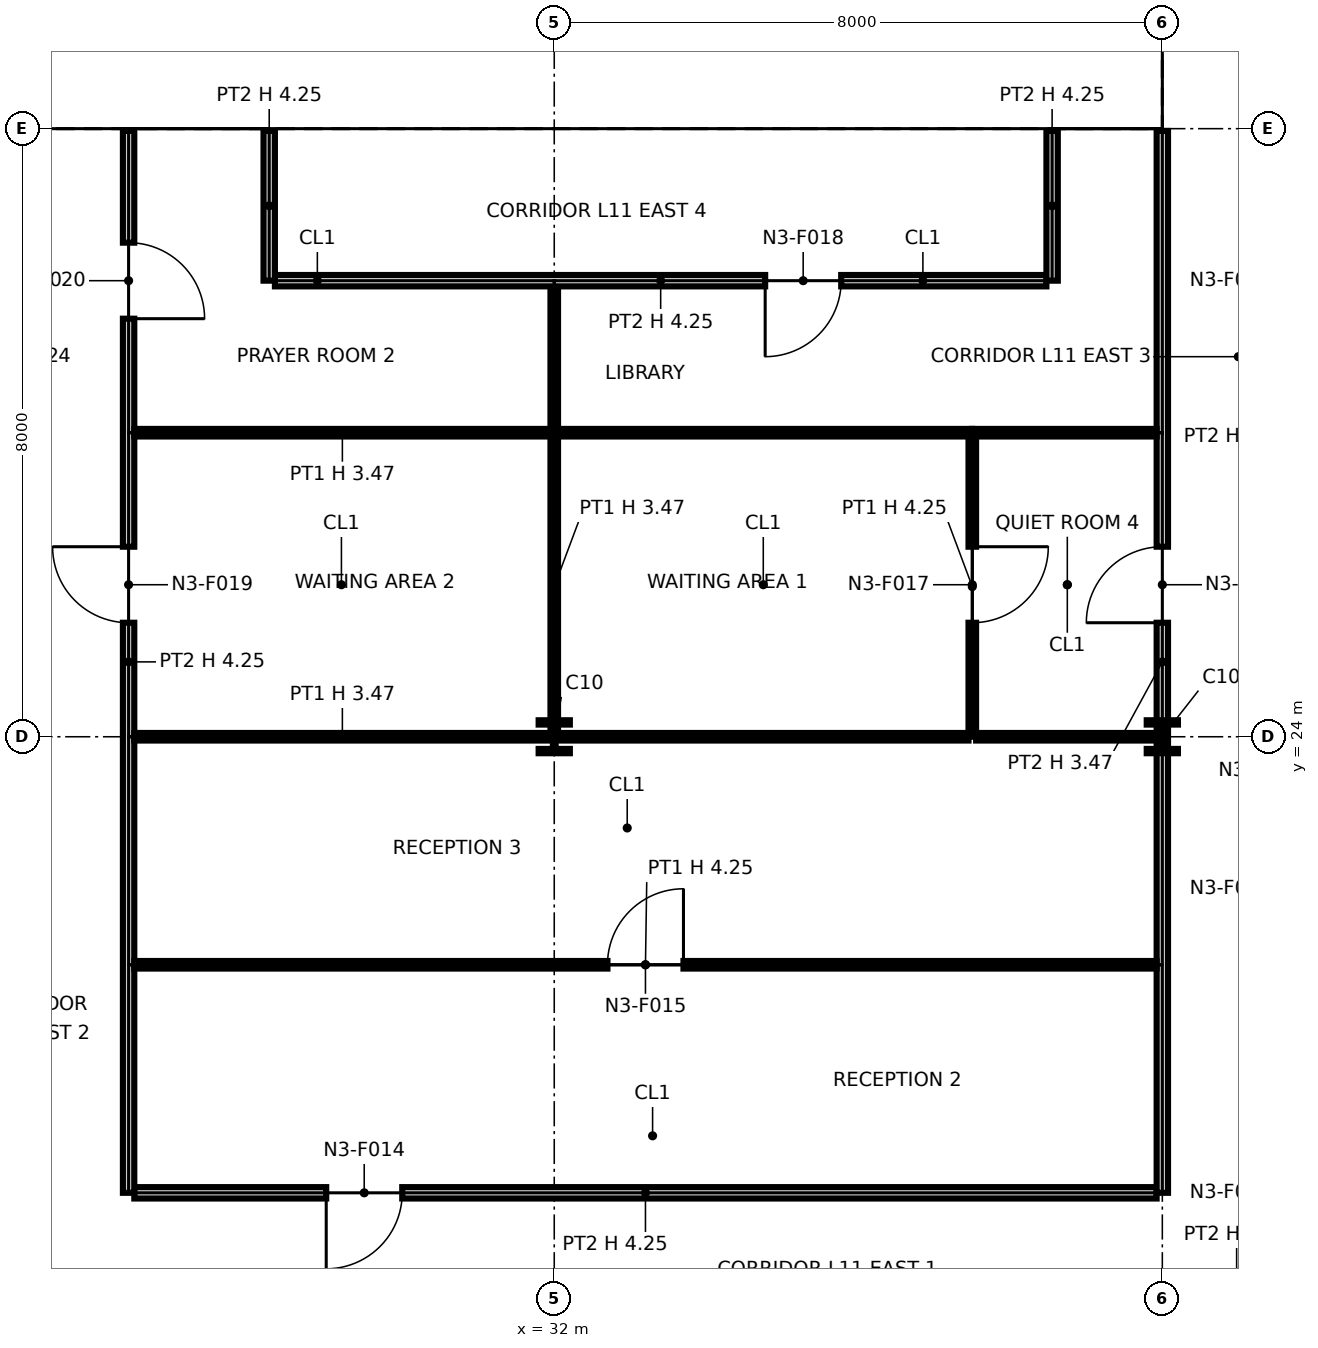
"""IFC4 building model, lengths in metres.
Left out: names, types, materials, properties, quantities, classifications, styles, units other than length and angle.
Written with IfcOpenShell. Run it as: python <this file> out.ifc"""

import sys

from ifc_helpers import new_model, si_unit, direction, frame, frame_2d, origin, origin_2d, place, context, subcontext, project, spatial, polyline, rectangle, i_section, outline, extrude, element, fill, save


model = new_model("IFC4")
c1 = context("Model", 3, precision=1e-05, world=origin(), true_north=direction((0.0, 1.0)))
c2 = subcontext(c1, "Body", "Model", "MODEL_VIEW")
j1 = project(units=[si_unit("LENGTHUNIT", "METRE"), si_unit("PLANEANGLEUNIT", "RADIAN")], contexts=[c1])
p1 = place(None, origin())
s1 = spatial("IfcSite", under=j1, at=p1, CompositionType="ELEMENT")
p2 = place(p1, origin())
s2 = spatial("IfcBuilding", under=s1, at=p2, CompositionType="ELEMENT")
p3 = place(p2, frame((0.0, 0.0, 65.6)))
s3 = spatial("IfcBuildingStorey", under=s2, at=p3, CompositionType="ELEMENT", Elevation=65.6)
p4 = place(p3, frame((32.0, 24.0, 0.0), z_axis=(0.0, 0.0, 1.0), x_axis=(1.0, 0.0, 0.0)))
e1 = element("IfcColumn", 1, at=p4, inside=s3, PredefinedType="COLUMN", context=c2, shape_type="SweptSolid", body=[
    extrude(i_section(OverallWidth=0.411, OverallDepth=0.434, WebThickness=0.036, FlangeThickness=0.057, at=origin_2d()), origin(), (0.0, 0.0, 1.0), 4.25),
])
p5 = place(p3, frame((32.0, 32.0, 0.0), z_axis=(0.0, 0.0, 1.0), x_axis=(1.0, 0.0, 0.0)))
e2 = element("IfcColumn", 2, at=p5, inside=s3, PredefinedType="COLUMN", context=c2, shape_type="SweptSolid", body=[
    extrude(i_section(OverallWidth=0.371, OverallDepth=0.361, WebThickness=0.012, FlangeThickness=0.02, at=origin_2d()), origin(), (0.0, 0.0, 1.0), 4.25),
])
p6 = place(p3, frame((40.0, 24.0, 0.0), z_axis=(0.0, 0.0, 1.0), x_axis=(1.0, 0.0, 0.0)))
e3 = element("IfcColumn", 3, at=p6, inside=s3, PredefinedType="COLUMN", context=c2, shape_type="SweptSolid", body=[
    extrude(i_section(OverallWidth=0.411, OverallDepth=0.434, WebThickness=0.036, FlangeThickness=0.057, at=origin_2d()), origin(), (0.0, 0.0, 1.0), 4.25),
])
p7 = place(p3, frame((40.0, 32.0, 0.0), z_axis=(0.0, 0.0, 1.0), x_axis=(1.0, 0.0, 0.0)))
e4 = element("IfcColumn", 4, at=p7, inside=s3, PredefinedType="COLUMN", context=c2, shape_type="SweptSolid", body=[
    extrude(i_section(OverallWidth=0.371, OverallDepth=0.361, WebThickness=0.012, FlangeThickness=0.02, at=origin_2d()), origin(), (0.0, 0.0, 1.0), 4.25),
])
p8 = place(p3, frame((24.65, 32.75, 0.0), z_axis=(0.0, 0.0, 1.0), x_axis=(1.0, 0.0, 0.0)))
e5 = element("IfcWall", 5, at=p8, inside=s3, PredefinedType="PARTITIONING", context=c2, shape_type="SweptSolid", body=[
    extrude(outline(polyline([(0.0, 0.0), (14.7, 0.0), (14.7, 4.25), (7.469, 4.25), (7.469, 3.632), (7.231, 3.632), (7.23, 4.25), (0.0, 4.25), (0.0, 0.0)])), frame((0.0, 0.1, 0.0), z_axis=(0.0, -1.0, 0.0), x_axis=(1.0, 0.0, 0.0)), (0.0, 0.0, 1.0), 0.2),
])
p9 = place(p8, frame((4.1, 0.0, 0.0)))
e6 = element("IfcOpeningElement", 6, at=p9, cuts=e5, PredefinedType="OPENING", context=c2, shape_type="SweptSolid", body=[
    extrude(rectangle(XDim=1.8, YDim=2.1, at=frame_2d((0.9, 1.05))), frame((0.0, 0.11, 0.0), z_axis=(0.0, -1.0, 0.0), x_axis=(1.0, 0.0, 0.0)), (0.0, 0.0, 1.0), 0.22),
])
p10 = place(p8, frame((8.55, 0.0, 0.0)))
e7 = element("IfcOpeningElement", 7, at=p10, cuts=e5, PredefinedType="OPENING", context=c2, shape_type="SweptSolid", body=[
    extrude(rectangle(XDim=1.4, YDim=2.1, at=frame_2d((0.7, 1.05))), frame((0.0, 0.11, 0.0), z_axis=(0.0, -1.0, 0.0), x_axis=(1.0, 0.0, 0.0)), (0.0, 0.0, 1.0), 0.22),
])
p11 = place(p8, frame((12.0, 0.0, 0.0)))
e8 = element("IfcOpeningElement", 8, at=p11, cuts=e5, PredefinedType="OPENING", context=c2, shape_type="SweptSolid", body=[
    extrude(rectangle(XDim=1.4, YDim=2.1, at=frame_2d((0.7, 1.05))), frame((0.0, 0.11, 0.0), z_axis=(0.0, -1.0, 0.0), x_axis=(1.0, 0.0, 0.0)), (0.0, 0.0, 1.0), 0.22),
])
p12 = place(p3, frame((26.875, 32.85, 0.0), z_axis=(0.0, 0.0, 1.0), x_axis=(0.0, 1.0, 0.0)))
e9 = element("IfcWall", 9, at=p12, inside=s3, PredefinedType="PARTITIONING", context=c2, shape_type="SweptSolid", body=[
    extrude(rectangle(XDim=1.95, YDim=0.15, at=frame_2d((0.975, 0.0))), origin(), (0.0, 0.0, 1.0), 4.25),
])
p13 = place(p12, frame((0.6, 0.0, 0.0)))
e10 = element("IfcOpeningElement", 10, at=p13, cuts=e9, PredefinedType="OPENING", context=c2, shape_type="SweptSolid", body=[
    extrude(rectangle(XDim=0.9, YDim=2.1, at=frame_2d((0.45, 1.05))), frame((0.0, 0.085, 0.0), z_axis=(0.0, -1.0, 0.0), x_axis=(1.0, 0.0, 0.0)), (0.0, 0.0, 1.0), 0.17),
])
p14 = place(p3, frame((32.0, 32.85, 0.0), z_axis=(0.0, 0.0, 1.0), x_axis=(0.0, 1.0, 0.0)))
e11 = element("IfcWall", 11, at=p14, inside=s3, PredefinedType="PARTITIONING", context=c2, shape_type="SweptSolid", body=[
    extrude(rectangle(XDim=3.55, YDim=0.6, at=frame_2d((1.775, 0.0))), origin(), (0.0, 0.0, 1.0), 3.632),
])
for number, where, z_axis, x_axis in (
    (12, (35.6, 32.85, 0.0), (0.0, 0.0, 1.0), (0.0, 1.0, 0.0)),
    (13, (39.25, 32.85, 0.0), (0.0, 0.0, 1.0), (0.0, 1.0, 0.0)),
):
    element("IfcWall", number, at=place(p3, frame(where, z_axis=z_axis, x_axis=x_axis)), inside=s3, PredefinedType="PARTITIONING", context=c2, shape_type="SweptSolid", body=[
        extrude(rectangle(XDim=6.3, YDim=0.2, at=frame_2d((3.15, 0.0))), origin(), (0.0, 0.0, 1.0), 4.25),
    ])
p15 = place(p3, frame((26.475, 18.0, 0.0), z_axis=(0.0, 0.0, 1.0), x_axis=(1.0, 0.0, 0.0)))
e14 = element("IfcWall", 14, at=p15, inside=s3, PredefinedType="PARTITIONING", context=c2, shape_type="SweptSolid", body=[
    extrude(rectangle(XDim=13.45, YDim=0.15, at=frame_2d((6.725, 0.0))), origin(), (0.0, 0.0, 1.0), 4.25),
])
p16 = place(p15, frame((3.525, 0.0, 0.0), z_axis=(0.0, 0.0, 1.0), x_axis=(-1.0, 0.0, 0.0)))
e15 = element("IfcOpeningElement", 15, at=p16, cuts=e14, PredefinedType="OPENING", context=c2, shape_type="SweptSolid", body=[
    extrude(rectangle(XDim=1.0, YDim=2.1, at=frame_2d((0.5, 1.05))), frame((0.0, 0.085, 0.0), z_axis=(0.0, -1.0, 0.0), x_axis=(1.0, 0.0, 0.0)), (0.0, 0.0, 1.0), 0.17),
])
p17 = place(p3, frame((26.4, 18.0, 0.0), z_axis=(0.0, 0.0, 1.0), x_axis=(0.0, 1.0, 0.0)))
e16 = element("IfcWall", 16, at=p17, inside=s3, PredefinedType="PARTITIONING", context=c2, shape_type="SweptSolid", body=[
    extrude(outline(polyline([(0.0, 0.0), (13.97, 0.0), (13.97, 4.25), (10.3, 4.25), (10.298, 3.47), (9.702, 3.47), (9.7, 4.25), (6.3, 4.25), (6.298, 3.47), (5.702, 3.47), (5.7, 4.25), (2.3, 4.25), (2.298, 3.47), (1.702, 3.47), (1.7, 4.25), (0.0, 4.25), (0.0, 0.0)])), frame((0.0, 0.075, 0.0), z_axis=(0.0, -1.0, 0.0), x_axis=(1.0, 0.0, 0.0)), (0.0, 0.0, 1.0), 0.15),
])
p18 = place(p17, frame((7.5, 0.0, 0.0)))
e17 = element("IfcOpeningElement", 17, at=p18, cuts=e16, PredefinedType="OPENING", context=c2, shape_type="SweptSolid", body=[
    extrude(rectangle(XDim=1.0, YDim=2.1, at=frame_2d((0.5, 1.05))), frame((0.0, 0.085, 0.0), z_axis=(0.0, -1.0, 0.0), x_axis=(1.0, 0.0, 0.0)), (0.0, 0.0, 1.0), 0.17),
])
p19 = place(p17, frame((12.5, 0.0, 0.0), z_axis=(0.0, 0.0, 1.0), x_axis=(-1.0, 0.0, 0.0)))
e18 = element("IfcOpeningElement", 18, at=p19, cuts=e16, PredefinedType="OPENING", context=c2, shape_type="SweptSolid", body=[
    extrude(rectangle(XDim=1.0, YDim=2.1, at=frame_2d((0.5, 1.05))), frame((0.0, 0.085, 0.0), z_axis=(0.0, -1.0, 0.0), x_axis=(1.0, 0.0, 0.0)), (0.0, 0.0, 1.0), 0.17),
])
p20 = place(p3, frame((40.0, 18.0, 0.0), z_axis=(0.0, 0.0, 1.0), x_axis=(0.0, 1.0, 0.0)))
e19 = element("IfcWall", 19, at=p20, inside=s3, PredefinedType="PARTITIONING", context=c2, shape_type="SweptSolid", body=[
    extrude(rectangle(XDim=13.97, YDim=0.15, at=frame_2d((6.985, 0.0))), origin(), (0.0, 0.0, 1.0), 3.47),
])
p21 = place(p20, frame((7.5, 0.0, 0.0)))
e20 = element("IfcOpeningElement", 20, at=p21, cuts=e19, PredefinedType="OPENING", context=c2, shape_type="SweptSolid", body=[
    extrude(rectangle(XDim=1.0, YDim=2.1, at=frame_2d((0.5, 1.05))), frame((0.0, 0.085, 0.0), z_axis=(0.0, -1.0, 0.0), x_axis=(1.0, 0.0, 0.0)), (0.0, 0.0, 1.0), 0.17),
])
p22 = place(p3, frame((26.475, 21.0, 0.0), z_axis=(0.0, 0.0, 1.0), x_axis=(1.0, 0.0, 0.0)))
e21 = element("IfcWall", 21, at=p22, inside=s3, PredefinedType="PARTITIONING", context=c2, shape_type="SweptSolid", body=[
    extrude(rectangle(XDim=13.45, YDim=0.1, at=frame_2d((6.725, 0.0))), origin(), (0.0, 0.0, 1.0), 4.25),
])
p23 = place(p22, frame((6.225, 0.0, 0.0)))
e22 = element("IfcOpeningElement", 22, at=p23, cuts=e21, PredefinedType="OPENING", context=c2, shape_type="SweptSolid", body=[
    extrude(rectangle(XDim=1.0, YDim=2.1, at=frame_2d((0.5, 1.05))), frame((0.0, 0.06, 0.0), z_axis=(0.0, -1.0, 0.0), x_axis=(1.0, 0.0, 0.0)), (0.0, 0.0, 1.0), 0.12),
])
p24 = place(p3, frame((26.475, 24.0, 0.0), z_axis=(0.0, 0.0, 1.0), x_axis=(1.0, 0.0, 0.0)))
e23 = element("IfcWall", 23, at=p24, inside=s3, PredefinedType="PARTITIONING", context=c2, shape_type="SweptSolid", body=[
    extrude(rectangle(XDim=5.475, YDim=0.1, at=frame_2d((2.737, 0.0))), origin(), (0.0, 0.0, 1.0), 3.47),
])
p25 = place(p3, frame((32.05, 24.0, 0.0), z_axis=(0.0, 0.0, 1.0), x_axis=(1.0, 0.0, 0.0)))
e24 = element("IfcWall", 24, at=p25, inside=s3, PredefinedType="PARTITIONING", context=c2, shape_type="SweptSolid", body=[
    extrude(rectangle(XDim=5.4, YDim=0.1, at=frame_2d((2.7, 0.0))), origin(), (0.0, 0.0, 1.0), 3.47),
])
p26 = place(p3, frame((32.0, 24.0, 0.0), z_axis=(0.0, 0.0, 1.0), x_axis=(0.0, 1.0, 0.0)))
e25 = element("IfcWall", 25, at=p26, inside=s3, PredefinedType="PARTITIONING", context=c2, shape_type="SweptSolid", body=[
    extrude(rectangle(XDim=3.95, YDim=0.1, at=frame_2d((1.975, 0.0))), origin(), (0.0, 0.0, 1.0), 3.47),
])
p27 = place(p3, frame((37.55, 24.0, 0.0), z_axis=(0.0, 0.0, 1.0), x_axis=(1.0, 0.0, 0.0)))
e26 = element("IfcWall", 26, at=p27, inside=s3, PredefinedType="PARTITIONING", context=c2, shape_type="SweptSolid", body=[
    extrude(rectangle(XDim=2.375, YDim=0.1, at=frame_2d((1.188, 0.0))), origin(), (0.0, 0.0, 1.0), 3.47),
])
p28 = place(p3, frame((37.5, 24.0, 0.0), z_axis=(0.0, 0.0, 1.0), x_axis=(0.0, 1.0, 0.0)))
e27 = element("IfcWall", 27, at=p28, inside=s3, PredefinedType="PARTITIONING", context=c2, shape_type="SweptSolid", body=[
    extrude(rectangle(XDim=3.95, YDim=0.1, at=frame_2d((1.975, 0.0))), origin(), (0.0, 0.0, 1.0), 4.25),
])
p29 = place(p28, frame((2.5, 0.0, 0.0), z_axis=(0.0, 0.0, 1.0), x_axis=(-1.0, 0.0, 0.0)))
e28 = element("IfcOpeningElement", 28, at=p29, cuts=e27, PredefinedType="OPENING", context=c2, shape_type="SweptSolid", body=[
    extrude(rectangle(XDim=1.0, YDim=2.1, at=frame_2d((0.5, 1.05))), frame((0.0, 0.06, 0.0), z_axis=(0.0, -1.0, 0.0), x_axis=(1.0, 0.0, 0.0)), (0.0, 0.0, 1.0), 0.12),
])
p30 = place(p3, frame((26.475, 28.0, 0.0), z_axis=(0.0, 0.0, 1.0), x_axis=(1.0, 0.0, 0.0)))
e29 = element("IfcWall", 29, at=p30, inside=s3, PredefinedType="PARTITIONING", context=c2, shape_type="SweptSolid", body=[
    extrude(rectangle(XDim=5.475, YDim=0.1, at=frame_2d((2.737, 0.0))), origin(), (0.0, 0.0, 1.0), 3.47),
])
p31 = place(p3, frame((32.05, 28.0, 0.0), z_axis=(0.0, 0.0, 1.0), x_axis=(1.0, 0.0, 0.0)))
e30 = element("IfcWall", 30, at=p31, inside=s3, PredefinedType="PARTITIONING", context=c2, shape_type="SweptSolid", body=[
    extrude(rectangle(XDim=5.45, YDim=0.1, at=frame_2d((2.725, 0.0))), origin(), (0.0, 0.0, 1.0), 3.47),
])
p32 = place(p3, frame((32.0, 28.0, 0.0), z_axis=(0.0, 0.0, 1.0), x_axis=(0.0, 1.0, 0.0)))
e31 = element("IfcWall", 31, at=p32, inside=s3, PredefinedType="PARTITIONING", context=c2, shape_type="SweptSolid", body=[
    extrude(rectangle(XDim=1.925, YDim=0.1, at=frame_2d((0.962, 0.0))), origin(), (0.0, 0.0, 1.0), 3.47),
])
p33 = place(p3, frame((37.5, 28.0, 0.0), z_axis=(0.0, 0.0, 1.0), x_axis=(1.0, 0.0, 0.0)))
e32 = element("IfcWall", 32, at=p33, inside=s3, PredefinedType="PARTITIONING", context=c2, shape_type="SweptSolid", body=[
    extrude(rectangle(XDim=2.425, YDim=0.1, at=frame_2d((1.212, 0.0))), origin(), (0.0, 0.0, 1.0), 3.47),
])
p34 = place(p3, frame((28.325, 30.0, 0.0), z_axis=(0.0, 0.0, 1.0), x_axis=(1.0, 0.0, 0.0)))
e33 = element("IfcWall", 33, at=p34, inside=s3, PredefinedType="PARTITIONING", context=c2, shape_type="SweptSolid", body=[
    extrude(rectangle(XDim=10.15, YDim=0.15, at=frame_2d((5.075, 0.0))), origin(), (0.0, 0.0, 1.0), 4.25),
])
p35 = place(p34, frame((7.45, 0.0, 0.0), z_axis=(0.0, 0.0, 1.0), x_axis=(-1.0, 0.0, 0.0)))
e34 = element("IfcOpeningElement", 34, at=p35, cuts=e33, PredefinedType="OPENING", context=c2, shape_type="SweptSolid", body=[
    extrude(rectangle(XDim=1.0, YDim=2.1, at=frame_2d((0.5, 1.05))), frame((0.0, 0.085, 0.0), z_axis=(0.0, -1.0, 0.0), x_axis=(1.0, 0.0, 0.0)), (0.0, 0.0, 1.0), 0.17),
])
for number, where, z_axis, x_axis in (
    (35, (28.25, 30.0, 0.0), (0.0, 0.0, 1.0), (0.0, 1.0, 0.0)),
    (36, (38.55, 30.0, 0.0), (0.0, 0.0, 1.0), (0.0, 1.0, 0.0)),
):
    element("IfcWall", number, at=place(p3, frame(where, z_axis=z_axis, x_axis=x_axis)), inside=s3, PredefinedType="PARTITIONING", context=c2, shape_type="SweptSolid", body=[
        extrude(rectangle(XDim=1.97, YDim=0.15, at=frame_2d((0.985, 0.0))), origin(), (0.0, 0.0, 1.0), 4.25),
    ])
p36 = place(p9, origin())
e37 = element("IfcDoor", 37, at=p36, inside=s3, OperationType="DOUBLE_DOOR_SINGLE_SWING", PredefinedType="NOTDEFINED", context=c2, shape_type="SweptSolid", body=[
    extrude(rectangle(XDim=1.8, YDim=2.1, at=frame_2d((0.9, 1.05))), frame((0.0, 0.025, 0.0), z_axis=(0.0, -1.0, 0.0), x_axis=(1.0, 0.0, 0.0)), (0.0, 0.0, 1.0), 0.05),
])
fill(e6, e37)
p37 = place(p10, origin())
e38 = element("IfcDoor", 38, at=p37, inside=s3, OperationType="DOUBLE_DOOR_SINGLE_SWING", PredefinedType="NOTDEFINED", context=c2, shape_type="SweptSolid", body=[
    extrude(rectangle(XDim=1.4, YDim=2.1, at=frame_2d((0.7, 1.05))), frame((0.0, 0.025, 0.0), z_axis=(0.0, -1.0, 0.0), x_axis=(1.0, 0.0, 0.0)), (0.0, 0.0, 1.0), 0.05),
])
fill(e7, e38)
p38 = place(p11, origin())
e39 = element("IfcDoor", 39, at=p38, inside=s3, OperationType="DOUBLE_DOOR_SINGLE_SWING", PredefinedType="NOTDEFINED", context=c2, shape_type="SweptSolid", body=[
    extrude(rectangle(XDim=1.4, YDim=2.1, at=frame_2d((0.7, 1.05))), frame((0.0, 0.025, 0.0), z_axis=(0.0, -1.0, 0.0), x_axis=(1.0, 0.0, 0.0)), (0.0, 0.0, 1.0), 0.05),
])
fill(e8, e39)
p39 = place(p16, origin())
e40 = element("IfcDoor", 40, at=p39, inside=s3, OperationType="SINGLE_SWING_RIGHT", PredefinedType="DOOR", context=c2, shape_type="SweptSolid", body=[
    extrude(rectangle(XDim=1.0, YDim=2.1, at=frame_2d((0.5, 1.05))), frame((0.0, 0.025, 0.0), z_axis=(0.0, -1.0, 0.0), x_axis=(1.0, 0.0, 0.0)), (0.0, 0.0, 1.0), 0.05),
])
fill(e15, e40)
p40 = place(p23, origin())
e41 = element("IfcDoor", 41, at=p40, inside=s3, OperationType="SINGLE_SWING_RIGHT", PredefinedType="DOOR", context=c2, shape_type="SweptSolid", body=[
    extrude(rectangle(XDim=1.0, YDim=2.1, at=frame_2d((0.5, 1.05))), frame((0.0, 0.025, 0.0), z_axis=(0.0, -1.0, 0.0), x_axis=(1.0, 0.0, 0.0)), (0.0, 0.0, 1.0), 0.05),
])
fill(e22, e41)
p41 = place(p21, origin())
e42 = element("IfcDoor", 42, at=p41, inside=s3, OperationType="SINGLE_SWING_LEFT", PredefinedType="DOOR", context=c2, shape_type="SweptSolid", body=[
    extrude(rectangle(XDim=1.0, YDim=2.1, at=frame_2d((0.5, 1.05))), frame((0.0, 0.025, 0.0), z_axis=(0.0, -1.0, 0.0), x_axis=(1.0, 0.0, 0.0)), (0.0, 0.0, 1.0), 0.05),
])
fill(e20, e42)
p42 = place(p29, origin())
e43 = element("IfcDoor", 43, at=p42, inside=s3, OperationType="SINGLE_SWING_LEFT", PredefinedType="DOOR", context=c2, shape_type="SweptSolid", body=[
    extrude(rectangle(XDim=1.0, YDim=2.1, at=frame_2d((0.5, 1.05))), frame((0.0, 0.025, 0.0), z_axis=(0.0, -1.0, 0.0), x_axis=(1.0, 0.0, 0.0)), (0.0, 0.0, 1.0), 0.05),
])
fill(e28, e43)
p43 = place(p35, origin())
e44 = element("IfcDoor", 44, at=p43, inside=s3, OperationType="SINGLE_SWING_RIGHT", PredefinedType="DOOR", context=c2, shape_type="SweptSolid", body=[
    extrude(rectangle(XDim=1.0, YDim=2.1, at=frame_2d((0.5, 1.05))), frame((0.0, 0.025, 0.0), z_axis=(0.0, -1.0, 0.0), x_axis=(1.0, 0.0, 0.0)), (0.0, 0.0, 1.0), 0.05),
])
fill(e34, e44)
p44 = place(p18, origin())
e45 = element("IfcDoor", 45, at=p44, inside=s3, OperationType="SINGLE_SWING_RIGHT", PredefinedType="DOOR", context=c2, shape_type="SweptSolid", body=[
    extrude(rectangle(XDim=1.0, YDim=2.1, at=frame_2d((0.5, 1.05))), frame((0.0, 0.025, 0.0), z_axis=(0.0, -1.0, 0.0), x_axis=(1.0, 0.0, 0.0)), (0.0, 0.0, 1.0), 0.05),
])
fill(e17, e45)
p45 = place(p19, origin())
e46 = element("IfcDoor", 46, at=p45, inside=s3, OperationType="SINGLE_SWING_RIGHT", PredefinedType="DOOR", context=c2, shape_type="SweptSolid", body=[
    extrude(rectangle(XDim=1.0, YDim=2.1, at=frame_2d((0.5, 1.05))), frame((0.0, 0.025, 0.0), z_axis=(0.0, -1.0, 0.0), x_axis=(1.0, 0.0, 0.0)), (0.0, 0.0, 1.0), 0.05),
])
fill(e18, e46)
save(model, sys.argv[1])
